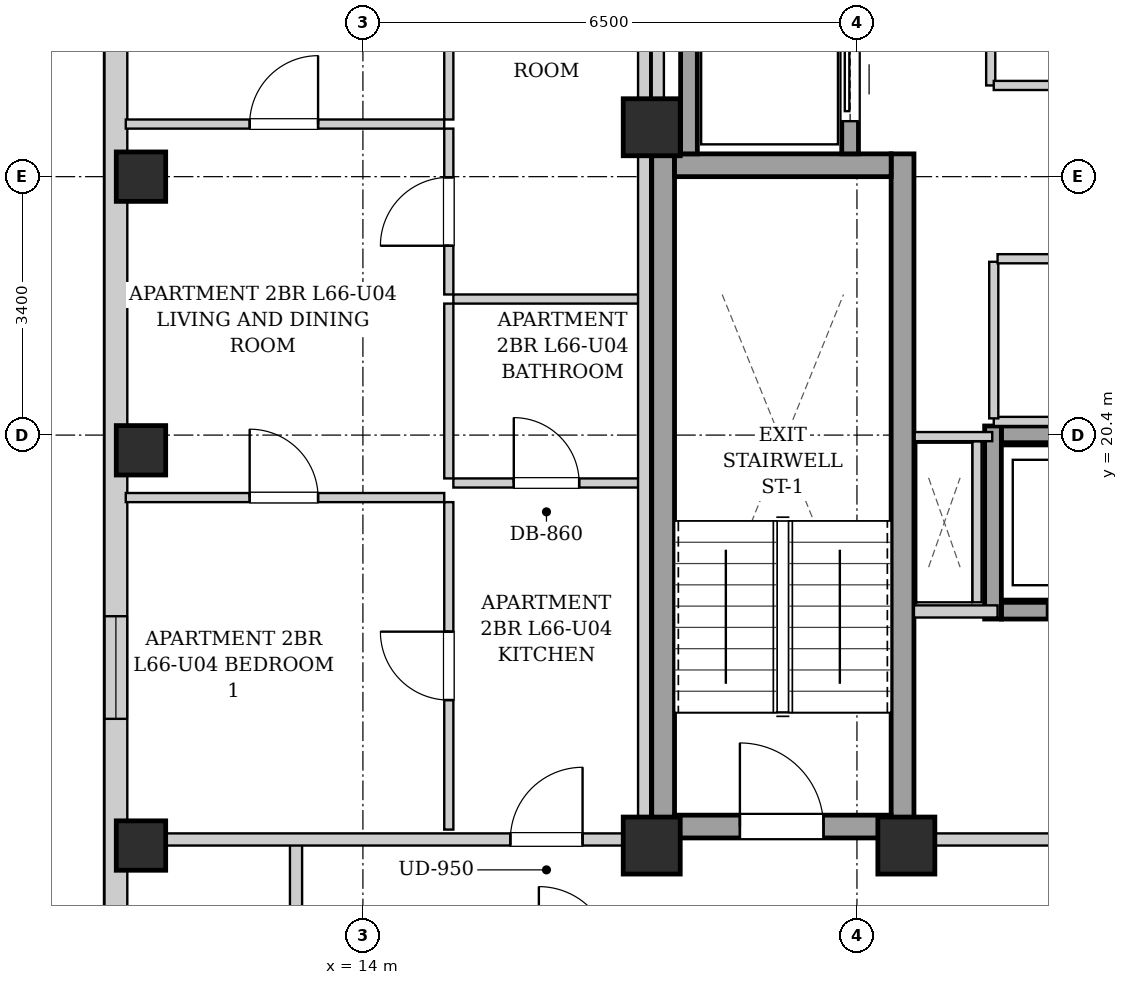
"""IFC4 building model, lengths in metres.
Left out: names, types, materials, properties, quantities, classifications, styles, units other than length and angle.
Written with IfcOpenShell. Run it as: python <this file> out.ifc"""

import sys

from ifc_helpers import new_model, si_unit, direction, frame, frame_2d, origin, origin_2d, place, context, subcontext, project, spatial, rectangle, extrude, element, fill, save


model = new_model("IFC4")
c1 = context("Model", 3, precision=1e-05, world=origin(), true_north=direction((0.0, 1.0)))
c2 = subcontext(c1, "Body", "Model", "MODEL_VIEW")
j1 = project(units=[si_unit("LENGTHUNIT", "METRE"), si_unit("PLANEANGLEUNIT", "RADIAN")], contexts=[c1])
p1 = place(None, origin())
s1 = spatial("IfcSite", under=j1, at=p1, CompositionType="ELEMENT")
p2 = place(p1, origin())
s2 = spatial("IfcBuilding", under=s1, at=p2, CompositionType="ELEMENT")
p3 = place(p2, frame((0.0, 0.0, 227.5)))
s3 = spatial("IfcBuildingStorey", under=s2, at=p3, CompositionType="ELEMENT", Elevation=227.5)
for number, where, z_axis, x_axis in (
    (1, (11.08, 15.0, 0.0), (0.0, 0.0, 1.0), (1.0, 0.0, 0.0)),
    (2, (11.08, 20.2, 0.0), (0.0, 0.0, 1.0), (1.0, 0.0, 0.0)),
    (3, (11.08, 23.8, 0.0), (0.0, 0.0, 1.0), (1.0, 0.0, 0.0)),
):
    element("IfcColumn", number, at=place(p3, frame(where, z_axis=z_axis, x_axis=x_axis)), inside=s3, PredefinedType="COLUMN", context=c2, shape_type="SweptSolid", body=[
        extrude(rectangle(XDim=0.65, YDim=0.65, at=origin_2d()), origin(), (0.0, 0.0, 1.0), 3.4),
    ])
for number, where, z_axis, x_axis in (
    (4, (17.8, 15.0, 0.0), (0.0, 0.0, 1.0), (1.0, 0.0, 0.0)),
    (5, (21.15, 15.0, 0.0), (0.0, 0.0, 1.0), (1.0, 0.0, 0.0)),
    (6, (17.8, 24.45, 0.0), (0.0, 0.0, 1.0), (1.0, 0.0, 0.0)),
):
    element("IfcColumn", number, at=place(p3, frame(where, z_axis=z_axis, x_axis=x_axis)), inside=s3, PredefinedType="COLUMN", context=c2, shape_type="SweptSolid", body=[
        extrude(rectangle(XDim=0.75, YDim=0.75, at=origin_2d()), origin(), (0.0, 0.0, 1.0), 3.4),
    ])
p4 = place(p3, frame((10.75, 6.3, 0.0), z_axis=(0.0, 0.0, 1.0), x_axis=(0.0, 1.0, 0.0)))
e7 = element("IfcWall", 7, at=p4, inside=s3, PredefinedType="SOLIDWALL", context=c2, shape_type="SweptSolid", body=[
    extrude(rectangle(XDim=31.4, YDim=0.3, at=frame_2d((15.7, 0.0))), origin(), (0.0, 0.0, 1.0), 3.14),
])
p5 = place(p4, frame((1.653, 0.0, 0.55)))
e8 = element("IfcOpeningElement", 8, at=p5, cuts=e7, PredefinedType="OPENING", context=c2, shape_type="SweptSolid", body=[
    extrude(rectangle(XDim=1.35, YDim=1.2, at=frame_2d((0.675, 0.6))), frame((0.0, 0.16, 0.0), z_axis=(0.0, -1.0, 0.0), x_axis=(1.0, 0.0, 0.0)), (0.0, 0.0, 1.0), 0.32),
])
p6 = place(p4, frame((10.367, 0.0, 0.55)))
e9 = element("IfcOpeningElement", 9, at=p6, cuts=e7, PredefinedType="OPENING", context=c2, shape_type="SweptSolid", body=[
    extrude(rectangle(XDim=1.35, YDim=1.2, at=frame_2d((0.675, 0.6))), frame((0.0, 0.16, 0.0), z_axis=(0.0, -1.0, 0.0), x_axis=(1.0, 0.0, 0.0)), (0.0, 0.0, 1.0), 0.32),
])
p7 = place(p4, frame((19.683, 0.0, 0.55)))
e10 = element("IfcOpeningElement", 10, at=p7, cuts=e7, PredefinedType="OPENING", context=c2, shape_type="SweptSolid", body=[
    extrude(rectangle(XDim=1.35, YDim=1.2, at=frame_2d((0.675, 0.6))), frame((0.0, 0.16, 0.0), z_axis=(0.0, -1.0, 0.0), x_axis=(1.0, 0.0, 0.0)), (0.0, 0.0, 1.0), 0.32),
])
for number, where, z_axis, x_axis in (
    (11, (17.95, 15.1, 0.0), (0.0, 0.0, 1.0), (0.0, 1.0, 0.0)),
    (12, (21.1, 15.1, 0.0), (0.0, 0.0, 1.0), (0.0, 1.0, 0.0)),
):
    element("IfcWall", number, at=place(p3, frame(where, z_axis=z_axis, x_axis=x_axis)), inside=s3, PredefinedType="SHEAR", context=c2, shape_type="SweptSolid", body=[
        extrude(rectangle(XDim=9.0, YDim=0.3, at=frame_2d((4.5, 0.0))), origin(), (0.0, 0.0, 1.0), 3.14),
    ])
p8 = place(p3, frame((18.1, 23.95, 0.0), z_axis=(0.0, 0.0, 1.0), x_axis=(1.0, 0.0, 0.0)))
e13 = element("IfcWall", 13, at=p8, inside=s3, PredefinedType="SHEAR", context=c2, shape_type="SweptSolid", body=[
    extrude(rectangle(XDim=2.85, YDim=0.3, at=frame_2d((1.425, 0.0))), origin(), (0.0, 0.0, 1.0), 3.14),
])
p9 = place(p3, frame((18.1, 15.25, 0.0), z_axis=(0.0, 0.0, 1.0), x_axis=(1.0, 0.0, 0.0)))
e14 = element("IfcWall", 14, at=p9, inside=s3, PredefinedType="SHEAR", context=c2, shape_type="SweptSolid", body=[
    extrude(rectangle(XDim=2.85, YDim=0.3, at=frame_2d((1.425, 0.0))), origin(), (0.0, 0.0, 1.0), 3.14),
])
p10 = place(p9, frame((0.86, 0.0, 0.0)))
e15 = element("IfcOpeningElement", 15, at=p10, cuts=e14, PredefinedType="OPENING", context=c2, shape_type="SweptSolid", body=[
    extrude(rectangle(XDim=1.1, YDim=2.05, at=frame_2d((0.55, 1.025))), frame((0.0, 0.16, 0.0), z_axis=(0.0, -1.0, 0.0), x_axis=(1.0, 0.0, 0.0)), (0.0, 0.0, 1.0), 0.32),
])
p11 = place(p3, frame((18.29, 24.1, 0.0), z_axis=(0.0, 0.0, 1.0), x_axis=(0.0, 1.0, 0.0)))
e16 = element("IfcWall", 16, at=p11, inside=s3, PredefinedType="SHEAR", context=c2, shape_type="SweptSolid", body=[
    extrude(rectangle(XDim=4.14, YDim=0.22, at=frame_2d((2.07, 0.0))), origin(), (0.0, 0.0, 1.0), 3.14),
])
p12 = place(p3, frame((20.41, 24.1, 0.0), z_axis=(0.0, 0.0, 1.0), x_axis=(0.0, 1.0, 0.0)))
e17 = element("IfcWall", 17, at=p12, inside=s3, PredefinedType="SHEAR", context=c2, shape_type="SweptSolid", body=[
    extrude(rectangle(XDim=1.96, YDim=0.22, at=frame_2d((0.98, 0.0))), origin(), (0.0, 0.0, 1.0), 3.14),
])
p13 = place(p12, frame((0.43, 0.0, 0.0)))
e18 = element("IfcOpeningElement", 18, at=p13, cuts=e17, PredefinedType="OPENING", context=c2, shape_type="SweptSolid", body=[
    extrude(rectangle(XDim=1.1, YDim=2.15, at=frame_2d((0.55, 1.075))), frame((0.0, 0.12, 0.0), z_axis=(0.0, -1.0, 0.0), x_axis=(1.0, 0.0, 0.0)), (0.0, 0.0, 1.0), 0.24),
])
p14 = place(p3, frame((22.4, 18.09, 0.0), z_axis=(0.0, 0.0, 1.0), x_axis=(1.0, 0.0, 0.0)))
e19 = element("IfcWall", 19, at=p14, inside=s3, PredefinedType="SHEAR", context=c2, shape_type="SweptSolid", body=[
    extrude(rectangle(XDim=2.4, YDim=0.22, at=frame_2d((1.2, 0.0))), origin(), (0.0, 0.0, 1.0), 3.14),
])
p15 = place(p14, frame((0.6, 0.0, 0.0)))
e20 = element("IfcOpeningElement", 20, at=p15, cuts=e19, PredefinedType="OPENING", context=c2, shape_type="SweptSolid", body=[
    extrude(rectangle(XDim=1.2, YDim=2.15, at=frame_2d((0.6, 1.075))), frame((0.0, 0.12, 0.0), z_axis=(0.0, -1.0, 0.0), x_axis=(1.0, 0.0, 0.0)), (0.0, 0.0, 1.0), 0.24),
])
p16 = place(p3, frame((22.4, 20.41, 0.0), z_axis=(0.0, 0.0, 1.0), x_axis=(1.0, 0.0, 0.0)))
e21 = element("IfcWall", 21, at=p16, inside=s3, PredefinedType="SHEAR", context=c2, shape_type="SweptSolid", body=[
    extrude(rectangle(XDim=2.4, YDim=0.22, at=frame_2d((1.2, 0.0))), origin(), (0.0, 0.0, 1.0), 3.14),
])
p17 = place(p3, frame((22.29, 17.98, 0.0), z_axis=(0.0, 0.0, 1.0), x_axis=(0.0, 1.0, 0.0)))
e22 = element("IfcWall", 22, at=p17, inside=s3, PredefinedType="SHEAR", context=c2, shape_type="SweptSolid", body=[
    extrude(rectangle(XDim=2.54, YDim=0.22, at=frame_2d((1.27, 0.0))), origin(), (0.0, 0.0, 1.0), 3.14),
])
p18 = place(p3, frame((21.25, 15.08, 0.0), z_axis=(0.0, 0.0, 1.0), x_axis=(1.0, 0.0, 0.0)))
e23 = element("IfcWall", 23, at=p18, inside=s3, PredefinedType="PARTITIONING", context=c2, shape_type="SweptSolid", body=[
    extrude(rectangle(XDim=8.5, YDim=0.16, at=frame_2d((4.25, 0.0))), origin(), (0.0, 0.0, 1.0), 2.668),
])
p19 = place(p18, frame((3.725, 0.0, 0.0)))
e24 = element("IfcOpeningElement", 24, at=p19, cuts=e23, PredefinedType="OPENING", context=c2, shape_type="SweptSolid", body=[
    extrude(rectangle(XDim=1.05, YDim=2.05, at=frame_2d((0.525, 1.025))), frame((0.0, 0.09, 0.0), z_axis=(0.0, -1.0, 0.0), x_axis=(1.0, 0.0, 0.0)), (0.0, 0.0, 1.0), 0.18),
])
p20 = place(p3, frame((21.25, 18.08, 0.0), z_axis=(0.0, 0.0, 1.0), x_axis=(1.0, 0.0, 0.0)))
e25 = element("IfcWall", 25, at=p20, inside=s3, PredefinedType="PARTITIONING", context=c2, shape_type="SweptSolid", body=[
    extrude(rectangle(XDim=1.1, YDim=0.16, at=frame_2d((0.55, 0.0))), origin(), (0.0, 0.0, 1.0), 3.14),
])
p21 = place(p3, frame((17.88, 24.12, 0.0), z_axis=(0.0, 0.0, 1.0), x_axis=(0.0, 1.0, 0.0)))
e26 = element("IfcWall", 26, at=p21, inside=s3, PredefinedType="PARTITIONING", context=c2, shape_type="SweptSolid", body=[
    extrude(rectangle(XDim=4.76, YDim=0.16, at=frame_2d((2.38, 0.0))), origin(), (0.0, 0.0, 1.0), 2.475),
])
p22 = place(p3, frame((22.08, 18.2, 0.0), z_axis=(0.0, 0.0, 1.0), x_axis=(0.0, 1.0, 0.0)))
e27 = element("IfcWall", 27, at=p22, inside=s3, PredefinedType="PARTITIONING", context=c2, shape_type="SweptSolid", body=[
    extrude(rectangle(XDim=2.12, YDim=0.12, at=frame_2d((1.06, 0.0))), origin(), (0.0, 0.0, 1.0), 3.14),
])
p23 = place(p3, frame((22.28, 20.38, 0.0), z_axis=(0.0, 0.0, 1.0), x_axis=(-1.0, 0.0, 0.0)))
e28 = element("IfcWall", 28, at=p23, inside=s3, PredefinedType="PARTITIONING", context=c2, shape_type="SweptSolid", body=[
    extrude(rectangle(XDim=1.02, YDim=0.12, at=frame_2d((0.51, 0.0))), origin(), (0.0, 0.0, 1.0), 3.14),
])
p24 = place(p3, frame((22.26, 25.0, 0.0), z_axis=(0.0, 0.0, 1.0), x_axis=(0.0, 1.0, 0.0)))
e29 = element("IfcWall", 29, at=p24, inside=s3, PredefinedType="PARTITIONING", context=c2, shape_type="SweptSolid", body=[
    extrude(rectangle(XDim=3.86, YDim=0.12, at=frame_2d((1.93, 0.0))), origin(), (0.0, 0.0, 1.0), 3.14),
])
p25 = place(p3, frame((22.3, 25.0, 0.0), z_axis=(0.0, 0.0, 1.0), x_axis=(1.0, 0.0, 0.0)))
e30 = element("IfcWall", 30, at=p25, inside=s3, PredefinedType="PARTITIONING", context=c2, shape_type="SweptSolid", body=[
    extrude(rectangle(XDim=2.04, YDim=0.12, at=frame_2d((1.02, 0.0))), origin(), (0.0, 0.0, 1.0), 3.14),
])
p26 = place(p3, frame((22.3, 20.58, 0.0), z_axis=(0.0, 0.0, 1.0), x_axis=(1.0, 0.0, 0.0)))
e31 = element("IfcWall", 31, at=p26, inside=s3, PredefinedType="PARTITIONING", context=c2, shape_type="SweptSolid", body=[
    extrude(rectangle(XDim=7.35, YDim=0.12, at=frame_2d((3.675, 0.0))), origin(), (0.0, 0.0, 1.0), 3.14),
])
p27 = place(p3, frame((22.3, 20.62, 0.0), z_axis=(0.0, 0.0, 1.0), x_axis=(0.0, 1.0, 0.0)))
e32 = element("IfcWall", 32, at=p27, inside=s3, PredefinedType="PARTITIONING", context=c2, shape_type="SweptSolid", body=[
    extrude(rectangle(XDim=2.06, YDim=0.12, at=frame_2d((1.03, 0.0))), origin(), (0.0, 0.0, 1.0), 3.14),
])
p28 = place(p3, frame((22.35, 22.72, 0.0), z_axis=(0.0, 0.0, 1.0), x_axis=(1.0, 0.0, 0.0)))
e33 = element("IfcWall", 33, at=p28, inside=s3, PredefinedType="PARTITIONING", context=c2, shape_type="SweptSolid", body=[
    extrude(rectangle(XDim=7.27, YDim=0.12, at=frame_2d((3.635, 0.0))), origin(), (0.0, 0.0, 1.0), 3.14),
])
p29 = place(p28, frame((3.25, 0.0, 0.0)))
e34 = element("IfcOpeningElement", 34, at=p29, cuts=e33, PredefinedType="OPENING", context=c2, shape_type="SweptSolid", body=[
    extrude(rectangle(XDim=0.9, YDim=2.05, at=frame_2d((0.45, 1.025))), frame((0.0, 0.07, 0.0), z_axis=(0.0, -1.0, 0.0), x_axis=(1.0, 0.0, 0.0)), (0.0, 0.0, 1.0), 0.14),
])
p30 = place(p3, frame((13.12, 13.51, 0.0), z_axis=(0.0, 0.0, 1.0), x_axis=(0.0, 1.0, 0.0)))
e35 = element("IfcWall", 35, at=p30, inside=s3, PredefinedType="PARTITIONING", context=c2, shape_type="SweptSolid", body=[
    extrude(rectangle(XDim=1.58, YDim=0.16, at=frame_2d((0.79, 0.0))), origin(), (0.0, 0.0, 1.0), 3.14),
])
p31 = place(p3, frame((10.88, 15.08, 0.0), z_axis=(0.0, 0.0, 1.0), x_axis=(1.0, 0.0, 0.0)))
e36 = element("IfcWall", 36, at=p31, inside=s3, PredefinedType="PARTITIONING", context=c2, shape_type="SweptSolid", body=[
    extrude(rectangle(XDim=6.88, YDim=0.16, at=frame_2d((3.44, 0.0))), origin(), (0.0, 0.0, 1.0), 2.668),
])
p32 = place(p31, frame((5.06, 0.0, 0.0)))
e37 = element("IfcOpeningElement", 37, at=p32, cuts=e36, PredefinedType="OPENING", context=c2, shape_type="SweptSolid", body=[
    extrude(rectangle(XDim=0.95, YDim=2.1, at=frame_2d((0.475, 1.05))), frame((0.0, 0.09, 0.0), z_axis=(0.0, -1.0, 0.0), x_axis=(1.0, 0.0, 0.0)), (0.0, 0.0, 1.0), 0.18),
])
p33 = place(p3, frame((15.19, 22.19, 0.0), z_axis=(0.0, 0.0, 1.0), x_axis=(1.0, 0.0, 0.0)))
e38 = element("IfcWall", 38, at=p33, inside=s3, PredefinedType="PARTITIONING", context=c2, shape_type="SweptSolid", body=[
    extrude(rectangle(XDim=2.45, YDim=0.12, at=frame_2d((1.225, 0.0))), origin(), (0.0, 0.0, 1.0), 3.14),
])
p34 = place(p3, frame((15.13, 22.25, 0.0), z_axis=(0.0, 0.0, 1.0), x_axis=(0.0, 1.0, 0.0)))
e39 = element("IfcWall", 39, at=p34, inside=s3, PredefinedType="PARTITIONING", context=c2, shape_type="SweptSolid", body=[
    extrude(rectangle(XDim=2.182, YDim=0.12, at=frame_2d((1.091, 0.0))), origin(), (0.0, 0.0, 1.0), 3.14),
])
p35 = place(p34, frame((0.641, 0.0, 0.0)))
e40 = element("IfcOpeningElement", 40, at=p35, cuts=e39, PredefinedType="OPENING", context=c2, shape_type="SweptSolid", body=[
    extrude(rectangle(XDim=0.9, YDim=2.05, at=frame_2d((0.45, 1.025))), frame((0.0, 0.07, 0.0), z_axis=(0.0, -1.0, 0.0), x_axis=(1.0, 0.0, 0.0)), (0.0, 0.0, 1.0), 0.14),
])
p36 = place(p3, frame((15.13, 24.552, 0.0), z_axis=(0.0, 0.0, 1.0), x_axis=(0.0, 1.0, 0.0)))
e41 = element("IfcWall", 41, at=p36, inside=s3, PredefinedType="PARTITIONING", context=c2, shape_type="SweptSolid", body=[
    extrude(rectangle(XDim=4.308, YDim=0.12, at=frame_2d((2.154, 0.0))), origin(), (0.0, 0.0, 1.0), 3.14),
])
p37 = place(p36, frame((1.704, 0.0, 0.0)))
e42 = element("IfcOpeningElement", 42, at=p37, cuts=e41, PredefinedType="OPENING", context=c2, shape_type="SweptSolid", body=[
    extrude(rectangle(XDim=0.9, YDim=2.05, at=frame_2d((0.45, 1.025))), frame((0.0, 0.07, 0.0), z_axis=(0.0, -1.0, 0.0), x_axis=(1.0, 0.0, 0.0)), (0.0, 0.0, 1.0), 0.14),
])
p38 = place(p3, frame((15.19, 19.77, 0.0), z_axis=(0.0, 0.0, 1.0), x_axis=(1.0, 0.0, 0.0)))
e43 = element("IfcWall", 43, at=p38, inside=s3, PredefinedType="PARTITIONING", context=c2, shape_type="SweptSolid", body=[
    extrude(rectangle(XDim=2.45, YDim=0.12, at=frame_2d((1.225, 0.0))), origin(), (0.0, 0.0, 1.0), 3.14),
])
p39 = place(p38, frame((0.795, 0.0, 0.0)))
e44 = element("IfcOpeningElement", 44, at=p39, cuts=e43, PredefinedType="OPENING", context=c2, shape_type="SweptSolid", body=[
    extrude(rectangle(XDim=0.86, YDim=2.05, at=frame_2d((0.43, 1.025))), frame((0.0, 0.07, 0.0), z_axis=(0.0, -1.0, 0.0), x_axis=(1.0, 0.0, 0.0)), (0.0, 0.0, 1.0), 0.14),
])
p40 = place(p3, frame((15.13, 19.83, 0.0), z_axis=(0.0, 0.0, 1.0), x_axis=(0.0, 1.0, 0.0)))
e45 = element("IfcWall", 45, at=p40, inside=s3, PredefinedType="PARTITIONING", context=c2, shape_type="SweptSolid", body=[
    extrude(rectangle(XDim=2.3, YDim=0.12, at=frame_2d((1.15, 0.0))), origin(), (0.0, 0.0, 1.0), 3.14),
])
p41 = place(p3, frame((15.13, 15.21, 0.0), z_axis=(0.0, 0.0, 1.0), x_axis=(0.0, 1.0, 0.0)))
e46 = element("IfcWall", 46, at=p41, inside=s3, PredefinedType="PARTITIONING", context=c2, shape_type="SweptSolid", body=[
    extrude(rectangle(XDim=4.308, YDim=0.12, at=frame_2d((2.154, 0.0))), origin(), (0.0, 0.0, 1.0), 3.14),
])
p42 = place(p41, frame((1.704, 0.0, 0.0)))
e47 = element("IfcOpeningElement", 47, at=p42, cuts=e46, PredefinedType="OPENING", context=c2, shape_type="SweptSolid", body=[
    extrude(rectangle(XDim=0.9, YDim=2.05, at=frame_2d((0.45, 1.025))), frame((0.0, 0.07, 0.0), z_axis=(0.0, -1.0, 0.0), x_axis=(1.0, 0.0, 0.0)), (0.0, 0.0, 1.0), 0.14),
])
p43 = place(p3, frame((10.88, 19.578, 0.0), z_axis=(0.0, 0.0, 1.0), x_axis=(1.0, 0.0, 0.0)))
e48 = element("IfcWall", 48, at=p43, inside=s3, PredefinedType="PARTITIONING", context=c2, shape_type="SweptSolid", body=[
    extrude(rectangle(XDim=4.19, YDim=0.12, at=frame_2d((2.095, 0.0))), origin(), (0.0, 0.0, 1.0), 3.14),
])
p44 = place(p43, frame((1.63, 0.0, 0.0)))
e49 = element("IfcOpeningElement", 49, at=p44, cuts=e48, PredefinedType="OPENING", context=c2, shape_type="SweptSolid", body=[
    extrude(rectangle(XDim=0.9, YDim=2.05, at=frame_2d((0.45, 1.025))), frame((0.0, 0.07, 0.0), z_axis=(0.0, -1.0, 0.0), x_axis=(1.0, 0.0, 0.0)), (0.0, 0.0, 1.0), 0.14),
])
p45 = place(p3, frame((10.88, 24.492, 0.0), z_axis=(0.0, 0.0, 1.0), x_axis=(1.0, 0.0, 0.0)))
e50 = element("IfcWall", 50, at=p45, inside=s3, PredefinedType="PARTITIONING", context=c2, shape_type="SweptSolid", body=[
    extrude(rectangle(XDim=4.19, YDim=0.12, at=frame_2d((2.095, 0.0))), origin(), (0.0, 0.0, 1.0), 2.878),
])
p46 = place(p45, frame((1.63, 0.0, 0.0)))
e51 = element("IfcOpeningElement", 51, at=p46, cuts=e50, PredefinedType="OPENING", context=c2, shape_type="SweptSolid", body=[
    extrude(rectangle(XDim=0.9, YDim=2.05, at=frame_2d((0.45, 1.025))), frame((0.0, 0.07, 0.0), z_axis=(0.0, -1.0, 0.0), x_axis=(1.0, 0.0, 0.0)), (0.0, 0.0, 1.0), 0.14),
])
p47 = place(p3, frame((17.7, 15.02, 0.0), z_axis=(0.0, 0.0, 1.0), x_axis=(0.0, 1.0, 0.0)))
e52 = element("IfcWall", 52, at=p47, inside=s3, PredefinedType="PARTITIONING", context=c2, shape_type="SweptSolid", body=[
    extrude(rectangle(XDim=13.98, YDim=0.16, at=frame_2d((6.99, 0.0))), origin(), (0.0, 0.0, 1.0), 2.475),
])
p48 = place(p10, origin())
e53 = element("IfcDoor", 53, at=p48, inside=s3, OperationType="SINGLE_SWING_LEFT", PredefinedType="DOOR", context=c2, shape_type="SweptSolid", body=[
    extrude(rectangle(XDim=1.1, YDim=2.05, at=frame_2d((0.55, 1.025))), frame((0.0, 0.025, 0.0), z_axis=(0.0, -1.0, 0.0), x_axis=(1.0, 0.0, 0.0)), (0.0, 0.0, 1.0), 0.05),
])
fill(e15, e53)
p49 = place(p13, origin())
e54 = element("IfcDoor", 54, at=p49, inside=s3, OperationType="SLIDING_TO_LEFT", PredefinedType="DOOR", context=c2, shape_type="SweptSolid", body=[
    extrude(rectangle(XDim=1.1, YDim=2.15, at=frame_2d((0.55, 1.075))), frame((0.0, 0.025, 0.0), z_axis=(0.0, -1.0, 0.0), x_axis=(1.0, 0.0, 0.0)), (0.0, 0.0, 1.0), 0.05),
])
fill(e18, e54)
p50 = place(p15, origin())
e55 = element("IfcDoor", 55, at=p50, inside=s3, OperationType="SLIDING_TO_LEFT", PredefinedType="DOOR", context=c2, shape_type="SweptSolid", body=[
    extrude(rectangle(XDim=1.2, YDim=2.15, at=frame_2d((0.6, 1.075))), frame((0.0, 0.025, 0.0), z_axis=(0.0, -1.0, 0.0), x_axis=(1.0, 0.0, 0.0)), (0.0, 0.0, 1.0), 0.05),
])
fill(e20, e55)
p51 = place(p32, origin())
e56 = element("IfcDoor", 56, at=p51, inside=s3, OperationType="SINGLE_SWING_RIGHT", PredefinedType="DOOR", context=c2, shape_type="SweptSolid", body=[
    extrude(rectangle(XDim=0.95, YDim=2.1, at=frame_2d((0.475, 1.05))), frame((0.0, 0.025, 0.0), z_axis=(0.0, -1.0, 0.0), x_axis=(1.0, 0.0, 0.0)), (0.0, 0.0, 1.0), 0.05),
])
fill(e37, e56)
p52 = place(p35, origin())
e57 = element("IfcDoor", 57, at=p52, inside=s3, OperationType="SINGLE_SWING_LEFT", PredefinedType="DOOR", context=c2, shape_type="SweptSolid", body=[
    extrude(rectangle(XDim=0.9, YDim=2.05, at=frame_2d((0.45, 1.025))), frame((0.0, 0.025, 0.0), z_axis=(0.0, -1.0, 0.0), x_axis=(1.0, 0.0, 0.0)), (0.0, 0.0, 1.0), 0.05),
])
fill(e40, e57)
p53 = place(p39, origin())
e58 = element("IfcDoor", 58, at=p53, inside=s3, OperationType="SINGLE_SWING_LEFT", PredefinedType="DOOR", context=c2, shape_type="SweptSolid", body=[
    extrude(rectangle(XDim=0.86, YDim=2.05, at=frame_2d((0.43, 1.025))), frame((0.0, 0.025, 0.0), z_axis=(0.0, -1.0, 0.0), x_axis=(1.0, 0.0, 0.0)), (0.0, 0.0, 1.0), 0.05),
])
fill(e44, e58)
p54 = place(p42, origin())
e59 = element("IfcDoor", 59, at=p54, inside=s3, OperationType="SINGLE_SWING_RIGHT", PredefinedType="DOOR", context=c2, shape_type="SweptSolid", body=[
    extrude(rectangle(XDim=0.9, YDim=2.05, at=frame_2d((0.45, 1.025))), frame((0.0, 0.025, 0.0), z_axis=(0.0, -1.0, 0.0), x_axis=(1.0, 0.0, 0.0)), (0.0, 0.0, 1.0), 0.05),
])
fill(e47, e59)
p55 = place(p44, origin())
e60 = element("IfcDoor", 60, at=p55, inside=s3, OperationType="SINGLE_SWING_LEFT", PredefinedType="DOOR", context=c2, shape_type="SweptSolid", body=[
    extrude(rectangle(XDim=0.9, YDim=2.05, at=frame_2d((0.45, 1.025))), frame((0.0, 0.025, 0.0), z_axis=(0.0, -1.0, 0.0), x_axis=(1.0, 0.0, 0.0)), (0.0, 0.0, 1.0), 0.05),
])
fill(e49, e60)
p56 = place(p46, origin())
e61 = element("IfcDoor", 61, at=p56, inside=s3, OperationType="SINGLE_SWING_RIGHT", PredefinedType="DOOR", context=c2, shape_type="SweptSolid", body=[
    extrude(rectangle(XDim=0.9, YDim=2.05, at=frame_2d((0.45, 1.025))), frame((0.0, 0.025, 0.0), z_axis=(0.0, -1.0, 0.0), x_axis=(1.0, 0.0, 0.0)), (0.0, 0.0, 1.0), 0.05),
])
fill(e51, e61)
p57 = place(p6, origin())
e62 = element("IfcWindow", 62, at=p57, inside=s3, PartitioningType="SINGLE_PANEL", PredefinedType="WINDOW", context=c2, shape_type="SweptSolid", body=[
    extrude(rectangle(XDim=1.35, YDim=1.2, at=frame_2d((0.675, 0.6))), frame((0.0, 0.03, 0.0), z_axis=(0.0, -1.0, 0.0), x_axis=(1.0, 0.0, 0.0)), (0.0, 0.0, 1.0), 0.06),
])
fill(e9, e62)
save(model, sys.argv[1])
